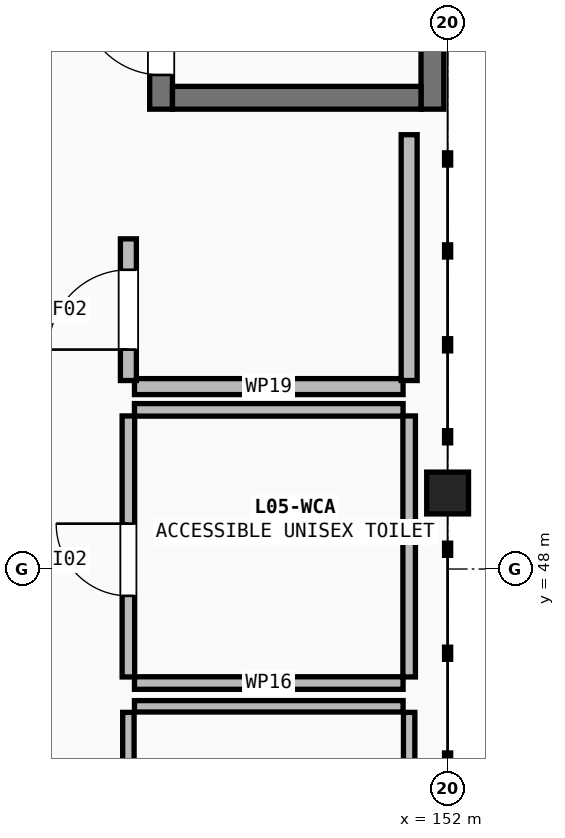
"""IFC4 building model, lengths in metres.
Left out: names, types, materials, properties, quantities, classifications, styles, units other than length and angle.
Written with IfcOpenShell. Run it as: python <this file> out.ifc"""

import sys

from ifc_helpers import new_model, si_unit, direction, frame, frame_2d, origin, origin_2d, place, context, subcontext, project, spatial, rectangle, extrude, element, fill, save


model = new_model("IFC4")
c1 = context("Model", 3, precision=1e-05, world=origin(), true_north=direction((0.0, 1.0)))
c2 = subcontext(c1, "Body", "Model", "MODEL_VIEW")
j1 = project(units=[si_unit("LENGTHUNIT", "METRE"), si_unit("PLANEANGLEUNIT", "RADIAN")], contexts=[c1])
p1 = place(None, origin())
s1 = spatial("IfcSite", under=j1, at=p1, CompositionType="ELEMENT")
p2 = place(p1, origin())
s2 = spatial("IfcBuilding", under=s1, at=p2, CompositionType="ELEMENT")
p3 = place(p2, frame((0.0, 0.0, 19.2)))
s3 = spatial("IfcBuildingStorey", under=s2, at=p3, CompositionType="ELEMENT", Elevation=19.2)
p4 = place(p3, frame((152.0, 49.0, 0.0), z_axis=(0.0, 0.0, 1.0), x_axis=(1.0, 0.0, 0.0)))
e1 = element("IfcColumn", 1, at=p4, inside=s3, PredefinedType="COLUMN", context=c2, shape_type="SweptSolid", body=[
    extrude(rectangle(XDim=0.55, YDim=0.55, at=origin_2d()), origin(), (0.0, 0.0, 1.0), 3.6),
])
p5 = place(p3, frame((148.23, 54.05, 0.0), z_axis=(0.0, 0.0, 1.0), x_axis=(0.0, 1.0, 0.0)))
e2 = element("IfcWall", 2, at=p5, inside=s3, PredefinedType="SHEAR", context=c2, shape_type="SweptSolid", body=[
    extrude(rectangle(XDim=9.9, YDim=0.3, at=frame_2d((4.95, 0.0))), origin(), (0.0, 0.0, 1.0), 3.6),
])
p6 = place(p5, frame((0.45, 0.0, 0.0)))
e3 = element("IfcOpeningElement", 3, at=p6, cuts=e2, PredefinedType="OPENING", context=c2, shape_type="SweptSolid", body=[
    extrude(rectangle(XDim=1.05, YDim=2.15, at=frame_2d((0.525, 1.075))), frame((0.0, 0.16, 0.0), z_axis=(0.0, -1.0, 0.0), x_axis=(1.0, 0.0, 0.0)), (0.0, 0.0, 1.0), 0.32),
])
p7 = place(p3, frame((151.8, 63.95, 0.0), z_axis=(0.0, 0.0, 1.0), x_axis=(0.0, -1.0, 0.0)))
e4 = element("IfcWall", 4, at=p7, inside=s3, PredefinedType="SHEAR", context=c2, shape_type="SweptSolid", body=[
    extrude(rectangle(XDim=9.9, YDim=0.3, at=frame_2d((4.95, 0.0))), origin(), (0.0, 0.0, 1.0), 3.6),
])
p8 = place(p3, frame((151.65, 54.2, 0.0), z_axis=(0.0, 0.0, 1.0), x_axis=(-1.0, 0.0, 0.0)))
e5 = element("IfcWall", 5, at=p8, inside=s3, PredefinedType="SHEAR", context=c2, shape_type="SweptSolid", body=[
    extrude(rectangle(XDim=3.27, YDim=0.3, at=frame_2d((1.635, 0.0))), origin(), (0.0, 0.0, 1.0), 3.6),
])
p9 = place(p3, frame((147.88, 46.194, 0.0), z_axis=(0.0, 0.0, 1.0), x_axis=(1.0, 0.0, 0.0)))
e6 = element("IfcWall", 6, at=p9, inside=s3, PredefinedType="PARTITIONING", context=c2, shape_type="SweptSolid", body=[
    extrude(rectangle(XDim=3.534, YDim=0.15, at=frame_2d((1.767, 0.0))), origin(), (0.0, 0.0, 1.0), 3.345),
])
p10 = place(p3, frame((147.8, 42.68, 0.0), z_axis=(0.0, 0.0, 1.0), x_axis=(0.0, 1.0, 0.0)))
e7 = element("IfcWall", 7, at=p10, inside=s3, PredefinedType="PARTITIONING", context=c2, shape_type="SweptSolid", body=[
    extrude(rectangle(XDim=3.434, YDim=0.15, at=frame_2d((1.717, 0.0))), origin(), (0.0, 0.0, 1.0), 2.755),
])
p11 = place(p10, frame((1.267, 0.0, 0.0)))
e8 = element("IfcOpeningElement", 8, at=p11, cuts=e7, PredefinedType="OPENING", context=c2, shape_type="SweptSolid", body=[
    extrude(rectangle(XDim=0.9, YDim=2.1, at=frame_2d((0.45, 1.05))), frame((0.0, 0.085, 0.0), z_axis=(0.0, -1.0, 0.0), x_axis=(1.0, 0.0, 0.0)), (0.0, 0.0, 1.0), 0.17),
])
p12 = place(p3, frame((151.494, 42.68, 0.0), z_axis=(0.0, 0.0, 1.0), x_axis=(0.0, 1.0, 0.0)))
e9 = element("IfcWall", 9, at=p12, inside=s3, PredefinedType="PARTITIONING", context=c2, shape_type="SweptSolid", body=[
    extrude(rectangle(XDim=3.434, YDim=0.15, at=frame_2d((1.717, 0.0))), origin(), (0.0, 0.0, 1.0), 2.755),
])
for number, where, z_axis, x_axis in (
    (10, (147.88, 46.5, 0.0), (0.0, 0.0, 1.0), (1.0, 0.0, 0.0)),
    (11, (147.88, 50.094, 0.0), (0.0, 0.0, 1.0), (1.0, 0.0, 0.0)),
):
    element("IfcWall", number, at=place(p3, frame(where, z_axis=z_axis, x_axis=x_axis)), inside=s3, PredefinedType="PARTITIONING", context=c2, shape_type="SweptSolid", body=[
        extrude(rectangle(XDim=3.534, YDim=0.165, at=frame_2d((1.767, 0.0))), origin(), (0.0, 0.0, 1.0), 3.345),
    ])
p13 = place(p3, frame((147.8, 46.58, 0.0), z_axis=(0.0, 0.0, 1.0), x_axis=(0.0, 1.0, 0.0)))
e12 = element("IfcWall", 12, at=p13, inside=s3, PredefinedType="PARTITIONING", context=c2, shape_type="SweptSolid", body=[
    extrude(rectangle(XDim=3.434, YDim=0.165, at=frame_2d((1.717, 0.0))), origin(), (0.0, 0.0, 1.0), 2.745),
])
p14 = place(p13, frame((1.067, 0.0, 0.0)))
e13 = element("IfcOpeningElement", 13, at=p14, cuts=e12, PredefinedType="OPENING", context=c2, shape_type="SweptSolid", body=[
    extrude(rectangle(XDim=0.95, YDim=2.1, at=frame_2d((0.475, 1.05))), frame((0.0, 0.093, 0.0), z_axis=(0.0, -1.0, 0.0), x_axis=(1.0, 0.0, 0.0)), (0.0, 0.0, 1.0), 0.185),
])
p15 = place(p3, frame((151.494, 46.58, 0.0), z_axis=(0.0, 0.0, 1.0), x_axis=(0.0, 1.0, 0.0)))
e14 = element("IfcWall", 14, at=p15, inside=s3, PredefinedType="PARTITIONING", context=c2, shape_type="SweptSolid", body=[
    extrude(rectangle(XDim=3.434, YDim=0.165, at=frame_2d((1.717, 0.0))), origin(), (0.0, 0.0, 1.0), 2.745),
])
p16 = place(p3, frame((147.88, 50.4, 0.0), z_axis=(0.0, 0.0, 1.0), x_axis=(1.0, 0.0, 0.0)))
e15 = element("IfcWall", 15, at=p16, inside=s3, PredefinedType="PARTITIONING", context=c2, shape_type="SweptSolid", body=[
    extrude(rectangle(XDim=3.534, YDim=0.21, at=frame_2d((1.767, 0.0))), origin(), (0.0, 0.0, 1.0), 3.345),
])
p17 = place(p3, frame((147.8, 50.48, 0.0), z_axis=(0.0, 0.0, 1.0), x_axis=(0.0, 1.0, 0.0)))
e16 = element("IfcWall", 16, at=p17, inside=s3, PredefinedType="PARTITIONING", context=c2, shape_type="SweptSolid", body=[
    extrude(rectangle(XDim=1.864, YDim=0.21, at=frame_2d((0.932, 0.0))), origin(), (0.0, 0.0, 1.0), 2.755),
])
p18 = place(p17, frame((0.407, 0.0, 0.0)))
e17 = element("IfcOpeningElement", 17, at=p18, cuts=e16, PredefinedType="OPENING", context=c2, shape_type="SweptSolid", body=[
    extrude(rectangle(XDim=1.05, YDim=2.15, at=frame_2d((0.525, 1.075))), frame((0.0, 0.115, 0.0), z_axis=(0.0, -1.0, 0.0), x_axis=(1.0, 0.0, 0.0)), (0.0, 0.0, 1.0), 0.23),
])
p19 = place(p3, frame((151.494, 50.48, 0.0), z_axis=(0.0, 0.0, 1.0), x_axis=(0.0, 1.0, 0.0)))
e18 = element("IfcWall", 18, at=p19, inside=s3, PredefinedType="PARTITIONING", context=c2, shape_type="SweptSolid", body=[
    extrude(rectangle(XDim=3.234, YDim=0.21, at=frame_2d((1.617, 0.0))), origin(), (0.0, 0.0, 1.0), 2.755),
])
p20 = place(p6, origin())
e19 = element("IfcDoor", 19, at=p20, inside=s3, OperationType="SINGLE_SWING_RIGHT", PredefinedType="DOOR", context=c2, shape_type="SweptSolid", body=[
    extrude(rectangle(XDim=1.05, YDim=2.15, at=frame_2d((0.525, 1.075))), frame((0.0, 0.025, 0.0), z_axis=(0.0, -1.0, 0.0), x_axis=(1.0, 0.0, 0.0)), (0.0, 0.0, 1.0), 0.05),
])
fill(e3, e19)
p21 = place(p14, origin())
e20 = element("IfcDoor", 20, at=p21, inside=s3, OperationType="SINGLE_SWING_RIGHT", PredefinedType="DOOR", context=c2, shape_type="SweptSolid", body=[
    extrude(rectangle(XDim=0.95, YDim=2.1, at=frame_2d((0.475, 1.05))), frame((0.0, 0.025, 0.0), z_axis=(0.0, -1.0, 0.0), x_axis=(1.0, 0.0, 0.0)), (0.0, 0.0, 1.0), 0.05),
])
fill(e13, e20)
p22 = place(p18, origin())
e21 = element("IfcDoor", 21, at=p22, inside=s3, OperationType="SINGLE_SWING_LEFT", PredefinedType="DOOR", context=c2, shape_type="SweptSolid", body=[
    extrude(rectangle(XDim=1.05, YDim=2.15, at=frame_2d((0.525, 1.075))), frame((0.0, 0.025, 0.0), z_axis=(0.0, -1.0, 0.0), x_axis=(1.0, 0.0, 0.0)), (0.0, 0.0, 1.0), 0.05),
])
fill(e17, e21)
save(model, sys.argv[1])
